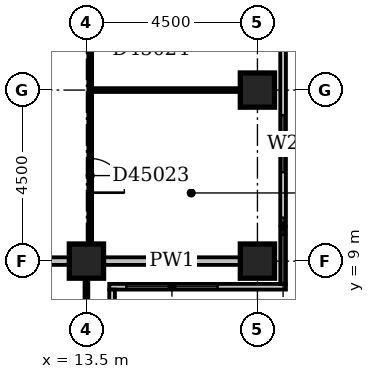
"""IFC4 building model, lengths in metres.
Left out: names, types, materials, properties, quantities, classifications, styles, units other than length and angle.
Written with IfcOpenShell. Run it as: python <this file> out.ifc"""

import sys

from ifc_helpers import new_model, si_unit, direction, frame, frame_2d, origin, origin_2d, place, context, subcontext, project, spatial, rectangle, extrude, element, fill, save


model = new_model("IFC4")
c1 = context("Model", 3, precision=1e-05, world=origin(), true_north=direction((0.0, 1.0)))
c2 = subcontext(c1, "Body", "Model", "MODEL_VIEW")
j1 = project(units=[si_unit("LENGTHUNIT", "METRE"), si_unit("PLANEANGLEUNIT", "RADIAN")], contexts=[c1])
p1 = place(None, origin())
s1 = spatial("IfcSite", under=j1, at=p1, CompositionType="ELEMENT")
p2 = place(p1, origin())
s2 = spatial("IfcBuilding", under=s1, at=p2, CompositionType="ELEMENT")
p3 = place(p2, frame((0.0, 0.0, 179.0)))
s3 = spatial("IfcBuildingStorey", under=s2, at=p3, CompositionType="ELEMENT", Elevation=179.0)
for number, where, z_axis, x_axis in (
    (1, (13.5, 9.0, -0.3), (0.0, 0.0, 1.0), (1.0, 0.0, 0.0)),
    (2, (18.0, 9.0, -0.3), (0.0, 0.0, 1.0), (1.0, 0.0, 0.0)),
    (3, (18.0, 13.5, -0.3), (0.0, 0.0, 1.0), (1.0, 0.0, 0.0)),
):
    element("IfcColumn", number, at=place(p3, frame(where, z_axis=z_axis, x_axis=x_axis)), inside=s3, PredefinedType="COLUMN", context=c2, shape_type="SweptSolid", body=[
        extrude(rectangle(XDim=0.9, YDim=0.9, at=origin_2d()), origin(), (0.0, 0.0, 1.0), 3.6),
    ])
p4 = place(p3, frame((14.175, 3.9, 0.0), z_axis=(0.0, 0.0, 1.0), x_axis=(0.0, 1.0, 0.0)))
e4 = element("IfcWall", 4, at=p4, inside=s3, PredefinedType="STANDARD", context=c2, shape_type="SweptSolid", body=[
    extrude(rectangle(XDim=4.35, YDim=0.15, at=frame_2d((2.175, 0.0))), origin(), (0.0, 0.0, 1.0), 2.7),
])
p5 = place(p4, frame((1.65, 0.0, 0.6)))
e5 = element("IfcOpeningElement", 5, at=p5, cuts=e4, PredefinedType="OPENING", context=c2, shape_type="SweptSolid", body=[
    extrude(rectangle(XDim=2.4, YDim=1.8, at=frame_2d((1.2, 0.9))), frame((0.0, 0.087, 0.0), z_axis=(0.0, -1.0, 0.0), x_axis=(1.0, 0.0, 0.0)), (0.0, 0.0, 1.0), 0.174),
])
p6 = place(p3, frame((14.1, 8.325, 0.0), z_axis=(0.0, 0.0, 1.0), x_axis=(1.0, 0.0, 0.0)))
e6 = element("IfcWall", 6, at=p6, inside=s3, PredefinedType="STANDARD", context=c2, shape_type="SweptSolid", body=[
    extrude(rectangle(XDim=4.65, YDim=0.15, at=frame_2d((2.325, 0.0))), origin(), (0.0, 0.0, 1.0), 2.7),
])
p7 = place(p6, frame((0.45, 0.0, 0.6)))
e7 = element("IfcOpeningElement", 7, at=p7, cuts=e6, PredefinedType="OPENING", context=c2, shape_type="SweptSolid", body=[
    extrude(rectangle(XDim=2.4, YDim=1.8, at=frame_2d((1.2, 0.9))), frame((0.0, 0.087, 0.0), z_axis=(0.0, -1.0, 0.0), x_axis=(1.0, 0.0, 0.0)), (0.0, 0.0, 1.0), 0.174),
])
p8 = place(p3, frame((18.675, 8.4, 0.0), z_axis=(0.0, 0.0, 1.0), x_axis=(0.0, 1.0, 0.0)))
e8 = element("IfcWall", 8, at=p8, inside=s3, PredefinedType="STANDARD", context=c2, shape_type="SweptSolid", body=[
    extrude(rectangle(XDim=8.85, YDim=0.15, at=frame_2d((4.425, 0.0))), origin(), (0.0, 0.0, 1.0), 2.7),
])
p9 = place(p8, frame((1.291, 0.0, 0.6)))
e9 = element("IfcOpeningElement", 9, at=p9, cuts=e8, PredefinedType="OPENING", context=c2, shape_type="SweptSolid", body=[
    extrude(rectangle(XDim=0.45, YDim=1.8, at=frame_2d((0.225, 0.9))), frame((0.0, 0.087, 0.0), z_axis=(0.0, -1.0, 0.0), x_axis=(1.0, 0.0, 0.0)), (0.0, 0.0, 1.0), 0.174),
])
p10 = place(p8, frame((2.941, 0.0, 0.6)))
e10 = element("IfcOpeningElement", 10, at=p10, cuts=e8, PredefinedType="OPENING", context=c2, shape_type="SweptSolid", body=[
    extrude(rectangle(XDim=1.5, YDim=1.8, at=frame_2d((0.75, 0.9))), frame((0.0, 0.087, 0.0), z_axis=(0.0, -1.0, 0.0), x_axis=(1.0, 0.0, 0.0)), (0.0, 0.0, 1.0), 0.174),
])
p11 = place(p8, frame((6.15, 0.0, 0.6)))
e11 = element("IfcOpeningElement", 11, at=p11, cuts=e8, PredefinedType="OPENING", context=c2, shape_type="SweptSolid", body=[
    extrude(rectangle(XDim=2.4, YDim=1.8, at=frame_2d((1.2, 0.9))), frame((0.0, 0.087, 0.0), z_axis=(0.0, -1.0, 0.0), x_axis=(1.0, 0.0, 0.0)), (0.0, 0.0, 1.0), 0.174),
])
p12 = place(p3, frame((13.5, 4.95, 0.0), z_axis=(0.0, 0.0, 1.0), x_axis=(0.0, 1.0, 0.0)))
e12 = element("IfcWall", 12, at=p12, inside=s3, PredefinedType="PARTITIONING", context=c2, shape_type="SweptSolid", body=[
    extrude(rectangle(XDim=3.6, YDim=0.1, at=frame_2d((1.8, 0.0))), origin(), (0.0, 0.0, 1.0), 2.7),
])
p13 = place(p3, frame((9.1, 9.0, 0.0), z_axis=(0.0, 0.0, 1.0), x_axis=(1.0, 0.0, 0.0)))
e13 = element("IfcWall", 13, at=p13, inside=s3, PredefinedType="PARTITIONING", context=c2, shape_type="SweptSolid", body=[
    extrude(rectangle(XDim=3.95, YDim=0.2, at=frame_2d((1.975, 0.0))), origin(), (0.0, 0.0, 1.0), 3.3),
])
p14 = place(p3, frame((13.95, 9.0, 0.0), z_axis=(0.0, 0.0, 1.0), x_axis=(1.0, 0.0, 0.0)))
e14 = element("IfcWall", 14, at=p14, inside=s3, PredefinedType="PARTITIONING", context=c2, shape_type="SweptSolid", body=[
    extrude(rectangle(XDim=3.6, YDim=0.2, at=frame_2d((1.8, 0.0))), origin(), (0.0, 0.0, 1.0), 2.7),
])
p15 = place(p3, frame((13.6, 9.45, 0.0), z_axis=(0.0, 0.0, 1.0), x_axis=(0.0, 1.0, 0.0)))
e15 = element("IfcWall", 15, at=p15, inside=s3, PredefinedType="PARTITIONING", context=c2, shape_type="SweptSolid", body=[
    extrude(rectangle(XDim=8.45, YDim=0.1, at=frame_2d((4.225, 0.0))), origin(), (0.0, 0.0, 1.0), 3.3),
])
p16 = place(p15, frame((1.35, 0.0, 0.0)))
e16 = element("IfcOpeningElement", 16, at=p16, cuts=e15, PredefinedType="OPENING", context=c2, shape_type="SweptSolid", body=[
    extrude(rectangle(XDim=0.9, YDim=2.1, at=frame_2d((0.45, 1.05))), frame((0.0, 0.062, 0.0), z_axis=(0.0, -1.0, 0.0), x_axis=(1.0, 0.0, 0.0)), (0.0, 0.0, 1.0), 0.124),
])
p17 = place(p15, frame((5.85, 0.0, 0.0)))
e17 = element("IfcOpeningElement", 17, at=p17, cuts=e15, PredefinedType="OPENING", context=c2, shape_type="SweptSolid", body=[
    extrude(rectangle(XDim=0.9, YDim=2.1, at=frame_2d((0.45, 1.05))), frame((0.0, 0.062, 0.0), z_axis=(0.0, -1.0, 0.0), x_axis=(1.0, 0.0, 0.0)), (0.0, 0.0, 1.0), 0.124),
])
p18 = place(p3, frame((13.65, 13.5, 0.0), z_axis=(0.0, 0.0, 1.0), x_axis=(1.0, 0.0, 0.0)))
e18 = element("IfcWall", 18, at=p18, inside=s3, PredefinedType="PARTITIONING", context=c2, shape_type="SweptSolid", body=[
    extrude(rectangle(XDim=3.9, YDim=0.1, at=frame_2d((1.95, 0.0))), origin(), (0.0, 0.0, 1.0), 3.3),
])
p19 = place(p7, origin())
e19 = element("IfcWindow", 19, at=p19, inside=s3, PartitioningType="SINGLE_PANEL", PredefinedType="WINDOW", context=c2, shape_type="SweptSolid", body=[
    extrude(rectangle(XDim=2.4, YDim=1.8, at=frame_2d((1.2, 0.9))), frame((0.0, 0.03, 0.0), z_axis=(0.0, -1.0, 0.0), x_axis=(1.0, 0.0, 0.0)), (0.0, 0.0, 1.0), 0.06),
])
fill(e7, e19)
p20 = place(p9, origin())
e20 = element("IfcWindow", 20, at=p20, inside=s3, PartitioningType="SINGLE_PANEL", PredefinedType="WINDOW", context=c2, shape_type="SweptSolid", body=[
    extrude(rectangle(XDim=0.45, YDim=1.8, at=frame_2d((0.225, 0.9))), frame((0.0, 0.03, 0.0), z_axis=(0.0, -1.0, 0.0), x_axis=(1.0, 0.0, 0.0)), (0.0, 0.0, 1.0), 0.06),
])
fill(e9, e20)
p21 = place(p10, origin())
e21 = element("IfcWindow", 21, at=p21, inside=s3, PartitioningType="SINGLE_PANEL", PredefinedType="WINDOW", context=c2, shape_type="SweptSolid", body=[
    extrude(rectangle(XDim=1.5, YDim=1.8, at=frame_2d((0.75, 0.9))), frame((0.0, 0.03, 0.0), z_axis=(0.0, -1.0, 0.0), x_axis=(1.0, 0.0, 0.0)), (0.0, 0.0, 1.0), 0.06),
])
fill(e10, e21)
p22 = place(p16, frame((0.9, 0.0, 0.0), z_axis=(0.0, 0.0, 1.0), x_axis=(-1.0, 0.0, 0.0)))
e22 = element("IfcDoor", 22, at=p22, inside=s3, OperationType="SINGLE_SWING_RIGHT", PredefinedType="DOOR", context=c2, shape_type="SweptSolid", body=[
    extrude(rectangle(XDim=0.9, YDim=2.1, at=frame_2d((0.45, 1.05))), frame((0.0, 0.025, 0.0), z_axis=(0.0, -1.0, 0.0), x_axis=(1.0, 0.0, 0.0)), (0.0, 0.0, 1.0), 0.05),
])
fill(e16, e22)
save(model, sys.argv[1])
